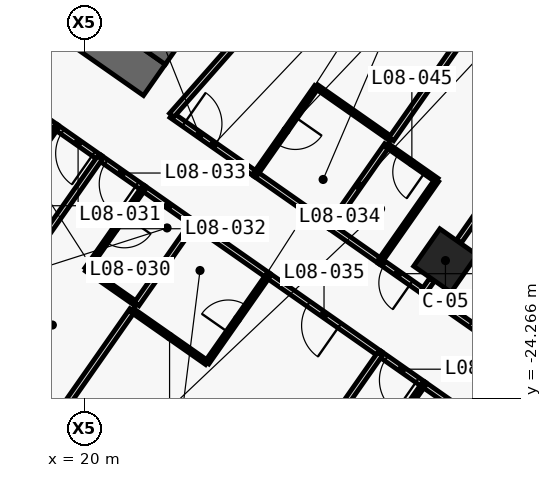
"""IFC4 building model, lengths in metres.
Left out: names, types, materials, properties, quantities, classifications, styles, units other than length and angle.
Written with IfcOpenShell. Run it as: python <this file> out.ifc"""

import sys

from ifc_helpers import new_model, si_unit, direction, frame, frame_2d, origin, origin_2d, place, context, subcontext, project, spatial, polyline, rectangle, outline, extrude, element, fill, save


model = new_model("IFC4")
c1 = context("Model", 3, precision=1e-05, world=origin(), true_north=direction((0.0, 1.0)))
c2 = subcontext(c1, "Body", "Model", "MODEL_VIEW")
j1 = project(units=[si_unit("LENGTHUNIT", "METRE"), si_unit("PLANEANGLEUNIT", "RADIAN")], contexts=[c1])
p1 = place(None, origin())
s1 = spatial("IfcSite", under=j1, at=p1, CompositionType="ELEMENT")
p2 = place(p1, origin())
s2 = spatial("IfcBuilding", under=s1, at=p2, CompositionType="ELEMENT")
p3 = place(p2, frame((0.0, 0.0, 54.5)))
s3 = spatial("IfcBuildingStorey", under=s2, at=p3, CompositionType="ELEMENT", Elevation=54.5)
p4 = place(p3, frame((-0.037, -0.585, 0.0), z_axis=(0.0, 0.0, 1.0), x_axis=(0.819157152511, -0.573569140985, 0.0)))
e1 = element("IfcWall", 1, at=p4, inside=s3, PredefinedType="SHEAR", context=c2, shape_type="SweptSolid", body=[
    extrude(outline(polyline([(26.695, 0.5), (0.0, 0.5), (0.7, -0.5), (26.695, -0.5), (26.695, 0.5)])), origin(), (0.0, 0.0, 1.0), 3.6),
])
p5 = place(p4, frame((6.695, 0.0, 0.0)))
e2 = element("IfcOpeningElement", 2, at=p5, cuts=e1, PredefinedType="OPENING", context=c2, shape_type="SweptSolid", body=[
    extrude(rectangle(XDim=1.5, YDim=2.1, at=frame_2d((0.75, 1.05))), frame((0.0, 0.51, 0.0), z_axis=(0.0, -1.0, 0.0), x_axis=(1.0, 0.0, 0.0)), (0.0, 0.0, 1.0), 1.02),
])
p6 = place(p4, frame((12.445, 0.0, 0.0)))
e3 = element("IfcOpeningElement", 3, at=p6, cuts=e1, PredefinedType="OPENING", context=c2, shape_type="SweptSolid", body=[
    extrude(rectangle(XDim=1.5, YDim=2.1, at=frame_2d((0.75, 1.05))), frame((0.0, 0.51, 0.0), z_axis=(0.0, -1.0, 0.0), x_axis=(1.0, 0.0, 0.0)), (0.0, 0.0, 1.0), 1.02),
])
p7 = place(p3, frame((21.708, -15.2, 0.0), z_axis=(0.0, 0.0, 1.0), x_axis=(0.573576324356, 0.819152122709, 0.0)))
e4 = element("IfcWall", 4, at=p7, inside=s3, PredefinedType="SHEAR", context=c2, shape_type="SweptSolid", body=[
    extrude(outline(polyline([(9.2, 0.5), (0.0, 0.5), (0.0, -0.5), (9.2, -0.5), (9.2, 0.5)])), origin(), (0.0, 0.0, 1.0), 3.6),
])
p8 = place(p7, frame((6.1, 0.0, 0.0)))
e5 = element("IfcOpeningElement", 5, at=p8, cuts=e4, PredefinedType="OPENING", context=c2, shape_type="SweptSolid", body=[
    extrude(rectangle(XDim=1.8, YDim=2.1, at=frame_2d((0.9, 1.05))), frame((0.0, 0.51, 0.0), z_axis=(0.0, -1.0, 0.0), x_axis=(1.0, 0.0, 0.0)), (0.0, 0.0, 1.0), 1.02),
])
p9 = place(p7, frame((1.9, 0.0, 0.0)))
e6 = element("IfcOpeningElement", 6, at=p9, cuts=e4, PredefinedType="OPENING", context=c2, shape_type="SweptSolid", body=[
    extrude(rectangle(XDim=1.8, YDim=2.1, at=frame_2d((0.9, 1.05))), frame((0.0, 0.51, 0.0), z_axis=(0.0, -1.0, 0.0), x_axis=(1.0, 0.0, 0.0)), (0.0, 0.0, 1.0), 1.02),
])
p10 = place(p3, frame((29.49, -20.649, 0.0), z_axis=(0.0, 0.0, 1.0), x_axis=(0.819152044289, -0.573576436351, 0.0)))
e7 = element("IfcColumn", 7, at=p10, inside=s3, PredefinedType="COLUMN", context=c2, shape_type="SweptSolid", body=[
    extrude(rectangle(XDim=1.2, YDim=1.2, at=origin_2d()), origin(), (0.0, 0.0, 1.0), 3.6),
])
p11 = place(p3, frame((22.284, -16.824, 0.0), z_axis=(0.0, 0.0, 1.0), x_axis=(0.819176640776, -0.573541307325, 0.0)))
e8 = element("IfcWall", 8, at=p11, inside=s3, PredefinedType="PARTITIONING", context=c2, shape_type="SweptSolid", body=[
    extrude(rectangle(XDim=2.698, YDim=0.15, at=frame_2d((1.349, 0.0))), origin(), (0.0, 0.0, 1.0), 3.32),
])
p12 = place(p11, frame((0.396, 0.0, 0.0)))
e9 = element("IfcOpeningElement", 9, at=p12, cuts=e8, PredefinedType="OPENING", context=c2, shape_type="SweptSolid", body=[
    extrude(rectangle(XDim=1.0, YDim=2.1, at=frame_2d((0.5, 1.05))), frame((0.0, 0.085, 0.0), z_axis=(0.0, -1.0, 0.0), x_axis=(1.0, 0.0, 0.0)), (0.0, 0.0, 1.0), 0.17),
])
p13 = place(p3, frame((24.491, -18.369, 0.0), z_axis=(0.0, 0.0, 1.0), x_axis=(0.819179439794, -0.573537309527, 0.0)))
e10 = element("IfcWall", 10, at=p13, inside=s3, PredefinedType="PARTITIONING", context=c2, shape_type="SweptSolid", body=[
    extrude(rectangle(XDim=2.404, YDim=0.15, at=frame_2d((1.202, 0.0))), origin(), (0.0, 0.0, 1.0), 3.32),
])
p14 = place(p3, frame((28.917, -21.469, 0.0), z_axis=(0.0, 0.0, 1.0), x_axis=(-0.81914197737, 0.573590813132, 0.0)))
e11 = element("IfcWall", 11, at=p14, inside=s3, PredefinedType="PARTITIONING", context=c2, shape_type="SweptSolid", body=[
    extrude(rectangle(XDim=1.403, YDim=0.15, at=frame_2d((0.701, 0.0))), origin(), (0.0, 0.0, 1.0), 2.6),
])
p15 = place(p14, frame((0.403, 0.0, 0.0)))
e12 = element("IfcOpeningElement", 12, at=p15, cuts=e11, PredefinedType="OPENING", context=c2, shape_type="SweptSolid", body=[
    extrude(rectangle(XDim=0.85, YDim=2.1, at=frame_2d((0.425, 1.05))), frame((0.0, 0.085, 0.0), z_axis=(0.0, -1.0, 0.0), x_axis=(1.0, 0.0, 0.0)), (0.0, 0.0, 1.0), 0.17),
])
p16 = place(p3, frame((26.457, -19.746, 0.0), z_axis=(0.0, 0.0, 1.0), x_axis=(0.819189013667, -0.573523634986, 0.0)))
e13 = element("IfcWall", 13, at=p16, inside=s3, PredefinedType="PARTITIONING", context=c2, shape_type="SweptSolid", body=[
    extrude(rectangle(XDim=1.604, YDim=0.15, at=frame_2d((0.802, 0.0))), origin(), (0.0, 0.0, 1.0), 3.32),
])
p17 = place(p3, frame((28.914, -21.467, 0.0), z_axis=(0.0, 0.0, 1.0), x_axis=(0.819145961204, -0.573585123798, 0.0)))
e14 = element("IfcWall", 14, at=p17, inside=s3, PredefinedType="PARTITIONING", context=c2, shape_type="SweptSolid", body=[
    extrude(rectangle(XDim=3.603, YDim=0.15, at=frame_2d((1.802, 0.0))), origin(), (0.0, 0.0, 1.0), 2.6),
])
p18 = place(p17, frame((1.502, 0.0, 0.0)))
e15 = element("IfcOpeningElement", 15, at=p18, cuts=e14, PredefinedType="OPENING", context=c2, shape_type="SweptSolid", body=[
    extrude(rectangle(XDim=1.0, YDim=2.1, at=frame_2d((0.5, 1.05))), frame((0.0, 0.085, 0.0), z_axis=(0.0, -1.0, 0.0), x_axis=(1.0, 0.0, 0.0)), (0.0, 0.0, 1.0), 0.17),
])
p19 = place(p3, frame((20.398, -17.945, 0.0), z_axis=(0.0, 0.0, 1.0), x_axis=(-0.819060210533, 0.573707566205, 0.0)))
e16 = element("IfcWall", 16, at=p19, inside=s3, PredefinedType="PARTITIONING", context=c2, shape_type="SweptSolid", body=[
    extrude(rectangle(XDim=1.403, YDim=0.15, at=frame_2d((0.702, 0.0))), origin(), (0.0, 0.0, 1.0), 2.6),
])
p20 = place(p19, frame((0.202, 0.0, 0.0)))
e17 = element("IfcOpeningElement", 17, at=p20, cuts=e16, PredefinedType="OPENING", context=c2, shape_type="SweptSolid", body=[
    extrude(rectangle(XDim=1.0, YDim=2.1, at=frame_2d((0.5, 1.05))), frame((0.0, 0.085, 0.0), z_axis=(0.0, -1.0, 0.0), x_axis=(1.0, 0.0, 0.0)), (0.0, 0.0, 1.0), 0.17),
])
p21 = place(p3, frame((19.251, -17.142, 0.0), z_axis=(0.0, 0.0, 1.0), x_axis=(-0.819189013667, 0.573523634986, 0.0)))
e18 = element("IfcWall", 18, at=p21, inside=s3, PredefinedType="PARTITIONING", context=c2, shape_type="SweptSolid", body=[
    extrude(rectangle(XDim=1.604, YDim=0.15, at=frame_2d((0.802, 0.0))), origin(), (0.0, 0.0, 1.0), 3.32),
])
p22 = place(p3, frame((21.544, -18.748, 0.0), z_axis=(0.0, 0.0, 1.0), x_axis=(-0.81914197737, 0.573590813132, 0.0)))
e19 = element("IfcWall", 19, at=p22, inside=s3, PredefinedType="PARTITIONING", context=c2, shape_type="SweptSolid", body=[
    extrude(rectangle(XDim=1.403, YDim=0.15, at=frame_2d((0.701, 0.0))), origin(), (0.0, 0.0, 1.0), 2.6),
])
p23 = place(p22, frame((0.201, 0.0, 0.0)))
e20 = element("IfcOpeningElement", 20, at=p23, cuts=e19, PredefinedType="OPENING", context=c2, shape_type="SweptSolid", body=[
    extrude(rectangle(XDim=1.0, YDim=2.1, at=frame_2d((0.5, 1.05))), frame((0.0, 0.085, 0.0), z_axis=(0.0, -1.0, 0.0), x_axis=(1.0, 0.0, 0.0)), (0.0, 0.0, 1.0), 0.17),
])
p24 = place(p3, frame((22.855, -19.666, 0.0), z_axis=(0.0, 0.0, 1.0), x_axis=(-0.819117502046, 0.573625764625, 0.0)))
e21 = element("IfcWall", 21, at=p24, inside=s3, PredefinedType="PARTITIONING", context=c2, shape_type="SweptSolid", body=[
    extrude(rectangle(XDim=1.604, YDim=0.15, at=frame_2d((0.802, 0.0))), origin(), (0.0, 0.0, 1.0), 3.32),
])
p25 = place(p3, frame((27.771, -23.107, 0.0), z_axis=(0.0, 0.0, 1.0), x_axis=(-0.819145961204, 0.573585123798, 0.0)))
e22 = element("IfcWall", 22, at=p25, inside=s3, PredefinedType="PARTITIONING", context=c2, shape_type="SweptSolid", body=[
    extrude(rectangle(XDim=3.603, YDim=0.15, at=frame_2d((1.802, 0.0))), origin(), (0.0, 0.0, 1.0), 2.6),
])
p26 = place(p25, frame((1.302, 0.0, 0.0)))
e23 = element("IfcOpeningElement", 23, at=p26, cuts=e22, PredefinedType="OPENING", context=c2, shape_type="SweptSolid", body=[
    extrude(rectangle(XDim=1.0, YDim=2.1, at=frame_2d((0.5, 1.05))), frame((0.0, 0.085, 0.0), z_axis=(0.0, -1.0, 0.0), x_axis=(1.0, 0.0, 0.0)), (0.0, 0.0, 1.0), 0.17),
])
p27 = place(p3, frame((24.821, -21.042, 0.0), z_axis=(0.0, 0.0, 1.0), x_axis=(-0.81911261637, 0.573632741136, 0.0)))
e24 = element("IfcWall", 24, at=p27, inside=s3, PredefinedType="PARTITIONING", context=c2, shape_type="SweptSolid", body=[
    extrude(rectangle(XDim=2.404, YDim=0.15, at=frame_2d((1.202, 0.0))), origin(), (0.0, 0.0, 1.0), 3.32),
])
p28 = place(p3, frame((28.917, -23.91, 0.0), z_axis=(0.0, 0.0, 1.0), x_axis=(-0.819117471667, 0.573625808005, 0.0)))
e25 = element("IfcWall", 25, at=p28, inside=s3, PredefinedType="PARTITIONING", context=c2, shape_type="SweptSolid", body=[
    extrude(rectangle(XDim=1.403, YDim=0.15, at=frame_2d((0.702, 0.0))), origin(), (0.0, 0.0, 1.0), 2.6),
])
p29 = place(p28, frame((0.201, 0.0, 0.0)))
e26 = element("IfcOpeningElement", 26, at=p29, cuts=e25, PredefinedType="OPENING", context=c2, shape_type="SweptSolid", body=[
    extrude(rectangle(XDim=1.0, YDim=2.1, at=frame_2d((0.5, 1.05))), frame((0.0, 0.085, 0.0), z_axis=(0.0, -1.0, 0.0), x_axis=(1.0, 0.0, 0.0)), (0.0, 0.0, 1.0), 0.17),
])
p30 = place(p3, frame((30.228, -24.828, 0.0), z_axis=(0.0, 0.0, 1.0), x_axis=(-0.819189013667, 0.573523634986, 0.0)))
e27 = element("IfcWall", 27, at=p30, inside=s3, PredefinedType="PARTITIONING", context=c2, shape_type="SweptSolid", body=[
    extrude(rectangle(XDim=1.604, YDim=0.15, at=frame_2d((0.802, 0.0))), origin(), (0.0, 0.0, 1.0), 3.32),
])
p31 = place(p3, frame((26.098, -16.076, 0.0), z_axis=(0.0, 0.0, 1.0), x_axis=(-0.573550118428, -0.819170471667, 0.0)))
e28 = element("IfcWall", 28, at=p31, inside=s3, PredefinedType="PARTITIONING", context=c2, shape_type="SweptSolid", body=[
    extrude(rectangle(XDim=2.8, YDim=0.12, at=frame_2d((1.4, 0.0))), origin(), (0.0, 0.0, 1.0), 2.6),
])
p32 = place(p31, frame((0.975, 0.0, 0.0)))
e29 = element("IfcOpeningElement", 29, at=p32, cuts=e28, PredefinedType="OPENING", context=c2, shape_type="SweptSolid", body=[
    extrude(rectangle(XDim=0.85, YDim=2.05, at=frame_2d((0.425, 1.025))), frame((0.0, 0.07, 0.0), z_axis=(0.0, -1.0, 0.0), x_axis=(1.0, 0.0, 0.0)), (0.0, 0.0, 1.0), 0.14),
])
p33 = place(p3, frame((28.065, -17.453, 0.0), z_axis=(0.0, 0.0, 1.0), x_axis=(-0.819155442668, 0.573571582932, 0.0)))
e30 = element("IfcWall", 30, at=p33, inside=s3, PredefinedType="PARTITIONING", context=c2, shape_type="SweptSolid", body=[
    extrude(rectangle(XDim=2.4, YDim=0.12, at=frame_2d((1.2, 0.0))), origin(), (0.0, 0.0, 1.0), 3.32),
])
p34 = place(p3, frame((32.94, -10.491, 0.0), z_axis=(0.0, 0.0, 1.0), x_axis=(-0.573593433868, -0.819140142237, 0.0)))
e31 = element("IfcWall", 31, at=p34, inside=s3, PredefinedType="PARTITIONING", context=c2, shape_type="SweptSolid", body=[
    extrude(rectangle(XDim=8.499, YDim=0.15, at=frame_2d((4.25, 0.0))), origin(), (0.0, 0.0, 1.0), 2.6),
])
p35 = place(p3, frame((22.285, -16.825, 0.0), z_axis=(0.0, 0.0, 1.0), x_axis=(0.661551268245, 0.749899939647, 0.0)))
e32 = element("IfcWall", 32, at=p35, inside=s3, PredefinedType="PARTITIONING", context=c2, shape_type="SweptSolid", body=[
    extrude(rectangle(XDim=6.541, YDim=0.15, at=frame_2d((3.271, 0.0))), origin(), (0.0, 0.0, 1.0), 2.6),
])
p36 = place(p3, frame((27.951, -17.616, 0.0), z_axis=(0.0, 0.0, 1.0), x_axis=(-0.573544201094, -0.819174614714, 0.0)))
e33 = element("IfcWall", 33, at=p36, inside=s3, PredefinedType="PARTITIONING", context=c2, shape_type="SweptSolid", body=[
    extrude(rectangle(XDim=2.602, YDim=0.15, at=frame_2d((1.301, 0.0))), origin(), (0.0, 0.0, 1.0), 2.6),
])
p37 = place(p3, frame((27.77, -20.666, 0.0), z_axis=(0.0, 0.0, 1.0), x_axis=(0.573537965655, 0.819178980414, 0.0)))
e34 = element("IfcWall", 34, at=p37, inside=s3, PredefinedType="PARTITIONING", context=c2, shape_type="SweptSolid", body=[
    extrude(rectangle(XDim=2.6, YDim=0.12, at=frame_2d((1.3, 0.0))), origin(), (0.0, 0.0, 1.0), 2.6),
])
p38 = place(p3, frame((29.261, -18.534, 0.0), z_axis=(0.0, 0.0, 1.0), x_axis=(-0.819253425856, 0.573431621227, 0.0)))
e35 = element("IfcWall", 35, at=p38, inside=s3, PredefinedType="PARTITIONING", context=c2, shape_type="SweptSolid", body=[
    extrude(rectangle(XDim=1.6, YDim=0.12, at=frame_2d((0.8, 0.0))), origin(), (0.0, 0.0, 1.0), 3.32),
])
p39 = place(p38, frame((0.375, 0.0, 0.0)))
e36 = element("IfcOpeningElement", 36, at=p39, cuts=e35, PredefinedType="OPENING", context=c2, shape_type="SweptSolid", body=[
    extrude(rectangle(XDim=0.85, YDim=2.05, at=frame_2d((0.425, 1.025))), frame((0.0, 0.07, 0.0), z_axis=(0.0, -1.0, 0.0), x_axis=(1.0, 0.0, 0.0)), (0.0, 0.0, 1.0), 0.14),
])
p40 = place(p3, frame((35.013, -12.76, 0.0), z_axis=(0.0, 0.0, 1.0), x_axis=(-0.573558725113, -0.819164445546, 0.0)))
e37 = element("IfcWall", 37, at=p40, inside=s3, PredefinedType="PARTITIONING", context=c2, shape_type="SweptSolid", body=[
    extrude(rectangle(XDim=9.01, YDim=0.15, at=frame_2d((4.505, 0.0))), origin(), (0.0, 0.0, 1.0), 2.6),
])
p41 = place(p3, frame((29.134, -21.156, 0.0), z_axis=(0.0, 0.0, 1.0), x_axis=(-0.572944929411, -0.819593867633, 0.0)))
e38 = element("IfcWall", 38, at=p41, inside=s3, PredefinedType="PARTITIONING", context=c2, shape_type="SweptSolid", body=[
    extrude(rectangle(XDim=0.38, YDim=0.15, at=frame_2d((0.19, 0.0))), origin(), (0.0, 0.0, 1.0), 2.6),
])
p42 = place(p3, frame((17.759, -19.271, 0.0), z_axis=(0.0, 0.0, 1.0), x_axis=(0.573600972199, 0.819134863556, 0.0)))
e39 = element("IfcWall", 39, at=p42, inside=s3, PredefinedType="PARTITIONING", context=c2, shape_type="SweptSolid", body=[
    extrude(rectangle(XDim=2.6, YDim=0.12, at=frame_2d((1.3, 0.0))), origin(), (0.0, 0.0, 1.0), 3.32),
])
p43 = place(p42, frame((0.875, 0.0, 0.0)))
e40 = element("IfcOpeningElement", 40, at=p43, cuts=e39, PredefinedType="OPENING", context=c2, shape_type="SweptSolid", body=[
    extrude(rectangle(XDim=0.85, YDim=2.05, at=frame_2d((0.425, 1.025))), frame((0.0, 0.07, 0.0), z_axis=(0.0, -1.0, 0.0), x_axis=(1.0, 0.0, 0.0)), (0.0, 0.0, 1.0), 0.14),
])
p44 = place(p3, frame((20.396, -17.944, 0.0), z_axis=(0.0, 0.0, 1.0), x_axis=(-0.57359826181, -0.819136761505, 0.0)))
e41 = element("IfcWall", 41, at=p44, inside=s3, PredefinedType="PARTITIONING", context=c2, shape_type="SweptSolid", body=[
    extrude(rectangle(XDim=6.63, YDim=0.15, at=frame_2d((3.315, 0.0))), origin(), (0.0, 0.0, 1.0), 2.6),
])
p45 = place(p3, frame((21.542, -18.747, 0.0), z_axis=(0.0, 0.0, 1.0), x_axis=(-0.573645091666, -0.819103967032, 0.0)))
e42 = element("IfcWall", 42, at=p45, inside=s3, PredefinedType="PARTITIONING", context=c2, shape_type="SweptSolid", body=[
    extrude(rectangle(XDim=2.6, YDim=0.12, at=frame_2d((1.3, 0.0))), origin(), (0.0, 0.0, 1.0), 3.32),
])
p46 = place(p45, frame((0.875, 0.0, 0.0)))
e43 = element("IfcOpeningElement", 43, at=p46, cuts=e42, PredefinedType="OPENING", context=c2, shape_type="SweptSolid", body=[
    extrude(rectangle(XDim=0.85, YDim=2.05, at=frame_2d((0.425, 1.025))), frame((0.0, 0.07, 0.0), z_axis=(0.0, -1.0, 0.0), x_axis=(1.0, 0.0, 0.0)), (0.0, 0.0, 1.0), 0.14),
])
p47 = place(p3, frame((20.051, -20.878, 0.0), z_axis=(0.0, 0.0, 1.0), x_axis=(0.81918174131, -0.573534022273, 0.0)))
e44 = element("IfcWall", 44, at=p47, inside=s3, PredefinedType="PARTITIONING", context=c2, shape_type="SweptSolid", body=[
    extrude(rectangle(XDim=1.6, YDim=0.12, at=frame_2d((0.8, 0.0))), origin(), (0.0, 0.0, 1.0), 3.32),
])
p48 = place(p3, frame((21.248, -21.958, 0.0), z_axis=(0.0, 0.0, 1.0), x_axis=(-0.573556991349, -0.819165659482, 0.0)))
e45 = element("IfcWall", 45, at=p48, inside=s3, PredefinedType="PARTITIONING", context=c2, shape_type="SweptSolid", body=[
    extrude(rectangle(XDim=4.501, YDim=0.15, at=frame_2d((2.25, 0.0))), origin(), (0.0, 0.0, 1.0), 2.5),
])
p49 = place(p3, frame((22.854, -19.665, 0.0), z_axis=(0.0, 0.0, 1.0), x_axis=(-0.573582085028, -0.819148089014, 0.0)))
e46 = element("IfcWall", 46, at=p49, inside=s3, PredefinedType="PARTITIONING", context=c2, shape_type="SweptSolid", body=[
    extrude(rectangle(XDim=2.6, YDim=0.15, at=frame_2d((1.3, 0.0))), origin(), (0.0, 0.0, 1.0), 3.32),
])
p50 = place(p3, frame((21.247, -21.959, 0.0), z_axis=(0.0, 0.0, 1.0), x_axis=(0.819155442668, -0.573571582932, 0.0)))
e47 = element("IfcWall", 47, at=p50, inside=s3, PredefinedType="PARTITIONING", context=c2, shape_type="SweptSolid", body=[
    extrude(rectangle(XDim=2.4, YDim=0.12, at=frame_2d((1.2, 0.0))), origin(), (0.0, 0.0, 1.0), 3.32),
])
p51 = place(p3, frame((23.215, -23.335, 0.0), z_axis=(0.0, 0.0, 1.0), x_axis=(0.573591086599, 0.819141785879, 0.0)))
e48 = element("IfcWall", 48, at=p51, inside=s3, PredefinedType="PARTITIONING", context=c2, shape_type="SweptSolid", body=[
    extrude(rectangle(XDim=2.8, YDim=0.12, at=frame_2d((1.4, 0.0))), origin(), (0.0, 0.0, 1.0), 3.32),
])
p52 = place(p51, frame((0.975, 0.0, 0.0)))
e49 = element("IfcOpeningElement", 49, at=p52, cuts=e48, PredefinedType="OPENING", context=c2, shape_type="SweptSolid", body=[
    extrude(rectangle(XDim=0.85, YDim=2.05, at=frame_2d((0.425, 1.025))), frame((0.0, 0.07, 0.0), z_axis=(0.0, -1.0, 0.0), x_axis=(1.0, 0.0, 0.0)), (0.0, 0.0, 1.0), 0.14),
])
p53 = place(p3, frame((27.769, -23.106, 0.0), z_axis=(0.0, 0.0, 1.0), x_axis=(-0.57359826181, -0.819136761505, 0.0)))
e50 = element("IfcWall", 50, at=p53, inside=s3, PredefinedType="PARTITIONING", context=c2, shape_type="SweptSolid", body=[
    extrude(rectangle(XDim=6.63, YDim=0.15, at=frame_2d((3.315, 0.0))), origin(), (0.0, 0.0, 1.0), 2.6),
])
p54 = place(p3, frame((28.915, -23.909, 0.0), z_axis=(0.0, 0.0, 1.0), x_axis=(-0.573645091666, -0.819103967032, 0.0)))
e51 = element("IfcWall", 51, at=p54, inside=s3, PredefinedType="PARTITIONING", context=c2, shape_type="SweptSolid", body=[
    extrude(rectangle(XDim=2.6, YDim=0.12, at=frame_2d((1.3, 0.0))), origin(), (0.0, 0.0, 1.0), 3.32),
])
p55 = place(p54, frame((0.875, 0.0, 0.0)))
e52 = element("IfcOpeningElement", 52, at=p55, cuts=e51, PredefinedType="OPENING", context=c2, shape_type="SweptSolid", body=[
    extrude(rectangle(XDim=0.85, YDim=2.05, at=frame_2d((0.425, 1.025))), frame((0.0, 0.07, 0.0), z_axis=(0.0, -1.0, 0.0), x_axis=(1.0, 0.0, 0.0)), (0.0, 0.0, 1.0), 0.14),
])
p56 = place(p20, origin())
e53 = element("IfcDoor", 53, at=p56, inside=s3, OperationType="SINGLE_SWING_RIGHT", PredefinedType="DOOR", context=c2, shape_type="SweptSolid", body=[
    extrude(rectangle(XDim=1.0, YDim=2.1, at=frame_2d((0.5, 1.05))), frame((0.0, 0.025, 0.0), z_axis=(0.0, -1.0, 0.0), x_axis=(1.0, 0.0, 0.0)), (0.0, 0.0, 1.0), 0.05),
])
fill(e17, e53)
p57 = place(p46, origin())
e54 = element("IfcDoor", 54, at=p57, inside=s3, OperationType="SINGLE_SWING_LEFT", PredefinedType="DOOR", context=c2, shape_type="SweptSolid", body=[
    extrude(rectangle(XDim=0.85, YDim=2.05, at=frame_2d((0.425, 1.025))), frame((0.0, 0.025, 0.0), z_axis=(0.0, -1.0, 0.0), x_axis=(1.0, 0.0, 0.0)), (0.0, 0.0, 1.0), 0.05),
])
fill(e43, e54)
p58 = place(p23, origin())
e55 = element("IfcDoor", 55, at=p58, inside=s3, OperationType="SINGLE_SWING_RIGHT", PredefinedType="DOOR", context=c2, shape_type="SweptSolid", body=[
    extrude(rectangle(XDim=1.0, YDim=2.1, at=frame_2d((0.5, 1.05))), frame((0.0, 0.025, 0.0), z_axis=(0.0, -1.0, 0.0), x_axis=(1.0, 0.0, 0.0)), (0.0, 0.0, 1.0), 0.05),
])
fill(e20, e55)
p59 = place(p52, origin())
e56 = element("IfcDoor", 56, at=p59, inside=s3, OperationType="SINGLE_SWING_RIGHT", PredefinedType="DOOR", context=c2, shape_type="SweptSolid", body=[
    extrude(rectangle(XDim=0.85, YDim=2.05, at=frame_2d((0.425, 1.025))), frame((0.0, 0.025, 0.0), z_axis=(0.0, -1.0, 0.0), x_axis=(1.0, 0.0, 0.0)), (0.0, 0.0, 1.0), 0.05),
])
fill(e49, e56)
p60 = place(p26, origin())
e57 = element("IfcDoor", 57, at=p60, inside=s3, OperationType="SINGLE_SWING_LEFT", PredefinedType="DOOR", context=c2, shape_type="SweptSolid", body=[
    extrude(rectangle(XDim=1.0, YDim=2.1, at=frame_2d((0.5, 1.05))), frame((0.0, 0.025, 0.0), z_axis=(0.0, -1.0, 0.0), x_axis=(1.0, 0.0, 0.0)), (0.0, 0.0, 1.0), 0.05),
])
fill(e23, e57)
p61 = place(p29, origin())
e58 = element("IfcDoor", 58, at=p61, inside=s3, OperationType="SINGLE_SWING_RIGHT", PredefinedType="DOOR", context=c2, shape_type="SweptSolid", body=[
    extrude(rectangle(XDim=1.0, YDim=2.1, at=frame_2d((0.5, 1.05))), frame((0.0, 0.025, 0.0), z_axis=(0.0, -1.0, 0.0), x_axis=(1.0, 0.0, 0.0)), (0.0, 0.0, 1.0), 0.05),
])
fill(e26, e58)
p62 = place(p32, origin())
e59 = element("IfcDoor", 59, at=p62, inside=s3, OperationType="SINGLE_SWING_LEFT", PredefinedType="DOOR", context=c2, shape_type="SweptSolid", body=[
    extrude(rectangle(XDim=0.85, YDim=2.05, at=frame_2d((0.425, 1.025))), frame((0.0, 0.025, 0.0), z_axis=(0.0, -1.0, 0.0), x_axis=(1.0, 0.0, 0.0)), (0.0, 0.0, 1.0), 0.05),
])
fill(e29, e59)
p63 = place(p12, origin())
e60 = element("IfcDoor", 60, at=p63, inside=s3, OperationType="SINGLE_SWING_RIGHT", PredefinedType="DOOR", context=c2, shape_type="SweptSolid", body=[
    extrude(rectangle(XDim=1.0, YDim=2.1, at=frame_2d((0.5, 1.05))), frame((0.0, 0.025, 0.0), z_axis=(0.0, -1.0, 0.0), x_axis=(1.0, 0.0, 0.0)), (0.0, 0.0, 1.0), 0.05),
])
fill(e9, e60)
p64 = place(p39, origin())
e61 = element("IfcDoor", 61, at=p64, inside=s3, OperationType="SINGLE_SWING_LEFT", PredefinedType="DOOR", context=c2, shape_type="SweptSolid", body=[
    extrude(rectangle(XDim=0.85, YDim=2.05, at=frame_2d((0.425, 1.025))), frame((0.0, 0.025, 0.0), z_axis=(0.0, -1.0, 0.0), x_axis=(1.0, 0.0, 0.0)), (0.0, 0.0, 1.0), 0.05),
])
fill(e36, e61)
p65 = place(p15, origin())
e62 = element("IfcDoor", 62, at=p65, inside=s3, OperationType="SINGLE_SWING_RIGHT", PredefinedType="DOOR", context=c2, shape_type="SweptSolid", body=[
    extrude(rectangle(XDim=0.85, YDim=2.1, at=frame_2d((0.425, 1.05))), frame((0.0, 0.025, 0.0), z_axis=(0.0, -1.0, 0.0), x_axis=(1.0, 0.0, 0.0)), (0.0, 0.0, 1.0), 0.05),
])
fill(e12, e62)
p66 = place(p18, origin())
e63 = element("IfcDoor", 63, at=p66, inside=s3, OperationType="SINGLE_SWING_RIGHT", PredefinedType="DOOR", context=c2, shape_type="SweptSolid", body=[
    extrude(rectangle(XDim=1.0, YDim=2.1, at=frame_2d((0.5, 1.05))), frame((0.0, 0.025, 0.0), z_axis=(0.0, -1.0, 0.0), x_axis=(1.0, 0.0, 0.0)), (0.0, 0.0, 1.0), 0.05),
])
fill(e15, e63)
save(model, sys.argv[1])
